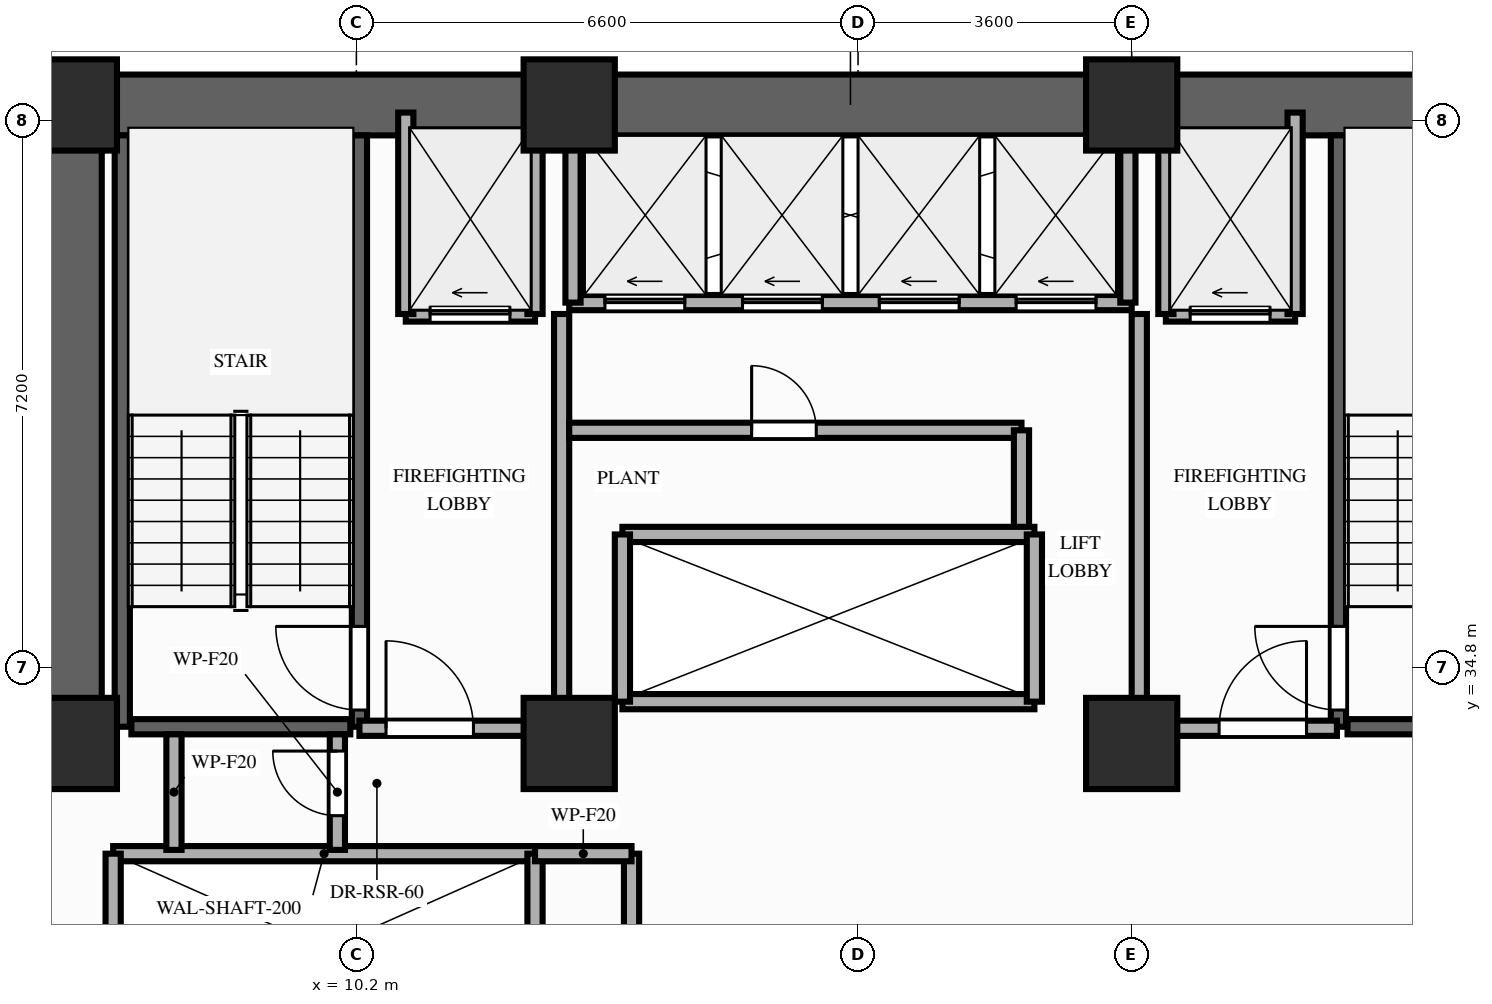
"""IFC4 building model, lengths in metres.
Left out: names, types, materials, properties, quantities, classifications, styles, units other than length and angle.
Written with IfcOpenShell. Run it as: python <this file> out.ifc"""

import sys

from ifc_helpers import new_model, si_unit, direction, frame, frame_2d, origin, origin_2d, place, context, subcontext, project, spatial, rectangle, extrude, element, fill, save


model = new_model("IFC4")
c1 = context("Model", 3, precision=1e-05, world=origin(), true_north=direction((0.0, 1.0)))
c2 = subcontext(c1, "Body", "Model", "MODEL_VIEW")
j1 = project(units=[si_unit("LENGTHUNIT", "METRE"), si_unit("PLANEANGLEUNIT", "RADIAN")], contexts=[c1])
p1 = place(None, origin())
s1 = spatial("IfcSite", under=j1, at=p1, CompositionType="ELEMENT")
p2 = place(p1, origin())
s2 = spatial("IfcBuilding", under=s1, at=p2, CompositionType="ELEMENT")
p3 = place(p2, frame((0.0, 0.0, 59.6)))
s3 = spatial("IfcBuildingStorey", under=s2, at=p3, CompositionType="ELEMENT", Elevation=59.6)
for number, where, z_axis, x_axis in (
    (1, (6.45, 33.8, 0.0), (0.0, 0.0, 1.0), (1.0, 0.0, 0.0)),
    (2, (13.0, 33.8, 0.0), (0.0, 0.0, 1.0), (1.0, 0.0, 0.0)),
    (3, (20.4, 33.8, 0.0), (0.0, 0.0, 1.0), (1.0, 0.0, 0.0)),
    (4, (6.45, 42.2, 0.0), (0.0, 0.0, 1.0), (1.0, 0.0, 0.0)),
    (5, (13.0, 42.2, 0.0), (0.0, 0.0, 1.0), (1.0, 0.0, 0.0)),
    (6, (20.4, 42.2, 0.0), (0.0, 0.0, 1.0), (1.0, 0.0, 0.0)),
):
    element("IfcColumn", number, at=place(p3, frame(where, z_axis=z_axis, x_axis=x_axis)), inside=s3, PredefinedType="COLUMN", context=c2, shape_type="SweptSolid", body=[
        extrude(rectangle(XDim=1.2, YDim=1.2, at=origin_2d()), origin(), (0.0, 0.0, 1.0), 3.2),
    ])
p4 = place(p3, frame((6.45, 42.2, 0.0), z_axis=(0.0, 0.0, 1.0), x_axis=(1.0, 0.0, 0.0)))
e7 = element("IfcWall", 7, at=p4, inside=s3, PredefinedType="SHEAR", context=c2, shape_type="SweptSolid", body=[
    extrude(rectangle(XDim=20.45, YDim=0.8, at=frame_2d((10.225, 0.0))), origin(), (0.0, 0.0, 1.0), 3.02),
])
p5 = place(p3, frame((6.45, 33.8, 0.0), z_axis=(0.0, 0.0, 1.0), x_axis=(0.0, 1.0, 0.0)))
e8 = element("IfcWall", 8, at=p5, inside=s3, PredefinedType="SHEAR", context=c2, shape_type="SweptSolid", body=[
    extrude(rectangle(XDim=7.95, YDim=0.8, at=frame_2d((3.975, 0.0))), origin(), (0.0, 0.0, 1.0), 3.02),
])
p6 = place(p3, frame((7.12, 34.02, 0.0), z_axis=(0.0, 0.0, 1.0), x_axis=(0.0, 1.0, 0.0)))
e9 = element("IfcWall", 9, at=p6, inside=s3, PredefinedType="SHEAR", context=c2, shape_type="SweptSolid", body=[
    extrude(rectangle(XDim=7.78, YDim=0.2, at=frame_2d((3.89, 0.0))), origin(), (0.0, 0.0, 1.0), 3.02),
])
p7 = place(p3, frame((10.24, 34.02, 0.0), z_axis=(0.0, 0.0, 1.0), x_axis=(0.0, 1.0, 0.0)))
e10 = element("IfcWall", 10, at=p7, inside=s3, PredefinedType="SHEAR", context=c2, shape_type="SweptSolid", body=[
    extrude(rectangle(XDim=7.78, YDim=0.2, at=frame_2d((3.89, 0.0))), origin(), (0.0, 0.0, 1.0), 3.02),
])
p8 = place(p7, frame((0.22, 0.0, 0.0)))
e11 = element("IfcOpeningElement", 11, at=p8, cuts=e10, PredefinedType="OPENING", context=c2, shape_type="SweptSolid", body=[
    extrude(rectangle(XDim=1.1, YDim=2.15, at=frame_2d((0.55, 1.075))), frame((0.0, 0.11, 0.0), z_axis=(0.0, -1.0, 0.0), x_axis=(1.0, 0.0, 0.0)), (0.0, 0.0, 1.0), 0.22),
])
p9 = place(p3, frame((7.24, 34.02, 0.0), z_axis=(0.0, 0.0, 1.0), x_axis=(1.0, 0.0, 0.0)))
e12 = element("IfcWall", 12, at=p9, inside=s3, PredefinedType="SHEAR", context=c2, shape_type="SweptSolid", body=[
    extrude(rectangle(XDim=2.88, YDim=0.2, at=frame_2d((1.44, 0.0))), origin(), (0.0, 0.0, 1.0), 3.02),
])
p10 = place(p3, frame((23.12, 34.02, 0.0), z_axis=(0.0, 0.0, 1.0), x_axis=(0.0, 1.0, 0.0)))
e13 = element("IfcWall", 13, at=p10, inside=s3, PredefinedType="SHEAR", context=c2, shape_type="SweptSolid", body=[
    extrude(rectangle(XDim=7.78, YDim=0.2, at=frame_2d((3.89, 0.0))), origin(), (0.0, 0.0, 1.0), 3.02),
])
p11 = place(p10, frame((0.22, 0.0, 0.0)))
e14 = element("IfcOpeningElement", 14, at=p11, cuts=e13, PredefinedType="OPENING", context=c2, shape_type="SweptSolid", body=[
    extrude(rectangle(XDim=1.1, YDim=2.15, at=frame_2d((0.55, 1.075))), frame((0.0, 0.11, 0.0), z_axis=(0.0, -1.0, 0.0), x_axis=(1.0, 0.0, 0.0)), (0.0, 0.0, 1.0), 0.22),
])
p12 = place(p3, frame((23.24, 34.02, 0.0), z_axis=(0.0, 0.0, 1.0), x_axis=(1.0, 0.0, 0.0)))
e15 = element("IfcWall", 15, at=p12, inside=s3, PredefinedType="SHEAR", context=c2, shape_type="SweptSolid", body=[
    extrude(rectangle(XDim=2.88, YDim=0.2, at=frame_2d((1.44, 0.0))), origin(), (0.0, 0.0, 1.0), 3.02),
])
p13 = place(p3, frame((7.0, 32.35, 0.0), z_axis=(0.0, 0.0, 1.0), x_axis=(1.0, 0.0, 0.0)))
e16 = element("IfcWall", 16, at=p13, inside=s3, PredefinedType="MOVABLE", context=c2, shape_type="SweptSolid", body=[
    extrude(rectangle(XDim=5.55, YDim=0.2, at=frame_2d((2.775, 0.0))), origin(), (0.0, 0.0, 1.0), 3.02),
])
for number, where, z_axis, x_axis in (
    (17, (7.0, 29.85, 0.0), (0.0, 0.0, 1.0), (0.0, 1.0, 0.0)),
    (18, (12.55, 29.85, 0.0), (0.0, 0.0, 1.0), (0.0, 1.0, 0.0)),
):
    element("IfcWall", number, at=place(p3, frame(where, z_axis=z_axis, x_axis=x_axis)), inside=s3, PredefinedType="MOVABLE", context=c2, shape_type="SweptSolid", body=[
        extrude(rectangle(XDim=2.5, YDim=0.2, at=frame_2d((1.25, 0.0))), origin(), (0.0, 0.0, 1.0), 3.02),
    ])
p14 = place(p3, frame((10.85, 39.45, 0.0), z_axis=(0.0, 0.0, 1.0), x_axis=(1.0, 0.0, 0.0)))
e19 = element("IfcWall", 19, at=p14, inside=s3, PredefinedType="MOVABLE", context=c2, shape_type="SweptSolid", body=[
    extrude(rectangle(XDim=1.7, YDim=0.2, at=frame_2d((0.85, 0.0))), origin(), (0.0, 0.0, 1.0), 3.02),
])
p15 = place(p14, frame((0.32, 0.0, 0.0)))
e20 = element("IfcOpeningElement", 20, at=p15, cuts=e19, PredefinedType="OPENING", context=c2, shape_type="SweptSolid", body=[
    extrude(rectangle(XDim=1.05, YDim=2.15, at=frame_2d((0.525, 1.075))), frame((0.0, 0.11, 0.0), z_axis=(0.0, -1.0, 0.0), x_axis=(1.0, 0.0, 0.0)), (0.0, 0.0, 1.0), 0.22),
])
p16 = place(p3, frame((20.85, 39.45, 0.0), z_axis=(0.0, 0.0, 1.0), x_axis=(1.0, 0.0, 0.0)))
e21 = element("IfcWall", 21, at=p16, inside=s3, PredefinedType="MOVABLE", context=c2, shape_type="SweptSolid", body=[
    extrude(rectangle(XDim=1.7, YDim=0.2, at=frame_2d((0.85, 0.0))), origin(), (0.0, 0.0, 1.0), 3.02),
])
p17 = place(p16, frame((0.32, 0.0, 0.0)))
e22 = element("IfcOpeningElement", 22, at=p17, cuts=e21, PredefinedType="OPENING", context=c2, shape_type="SweptSolid", body=[
    extrude(rectangle(XDim=1.05, YDim=2.15, at=frame_2d((0.525, 1.075))), frame((0.0, 0.11, 0.0), z_axis=(0.0, -1.0, 0.0), x_axis=(1.0, 0.0, 0.0)), (0.0, 0.0, 1.0), 0.22),
])
for number, where, z_axis, x_axis in (
    (23, (10.85, 39.45, 0.0), (0.0, 0.0, 1.0), (0.0, 1.0, 0.0)),
    (24, (12.55, 39.45, 0.0), (0.0, 0.0, 1.0), (0.0, 1.0, 0.0)),
):
    element("IfcWall", number, at=place(p3, frame(where, z_axis=z_axis, x_axis=x_axis)), inside=s3, PredefinedType="MOVABLE", context=c2, shape_type="SweptSolid", body=[
        extrude(rectangle(XDim=2.65, YDim=0.2, at=frame_2d((1.325, 0.0))), origin(), (0.0, 0.0, 1.0), 2.41),
    ])
p18 = place(p3, frame((12.9, 34.0, 0.0), z_axis=(0.0, 0.0, 1.0), x_axis=(0.0, 1.0, 0.0)))
e25 = element("IfcWall", 25, at=p18, inside=s3, PredefinedType="PARTITIONING", context=c2, shape_type="SweptSolid", body=[
    extrude(rectangle(XDim=5.45, YDim=0.2, at=frame_2d((2.725, 0.0))), origin(), (0.0, 0.0, 1.0), 2.41),
])
p19 = place(p3, frame((10.24, 34.0, 0.0), z_axis=(0.0, 0.0, 1.0), x_axis=(1.0, 0.0, 0.0)))
e26 = element("IfcWall", 26, at=p19, inside=s3, PredefinedType="PARTITIONING", context=c2, shape_type="SweptSolid", body=[
    extrude(rectangle(XDim=2.66, YDim=0.2, at=frame_2d((1.33, 0.0))), origin(), (0.0, 0.0, 1.0), 2.41),
])
p20 = place(p19, frame((0.35, 0.0, 0.0)))
e27 = element("IfcOpeningElement", 27, at=p20, cuts=e26, PredefinedType="OPENING", context=c2, shape_type="SweptSolid", body=[
    extrude(rectangle(XDim=1.15, YDim=2.15, at=frame_2d((0.575, 1.075))), frame((0.0, 0.11, 0.0), z_axis=(0.0, -1.0, 0.0), x_axis=(1.0, 0.0, 0.0)), (0.0, 0.0, 1.0), 0.22),
])
for number, where, z_axis, x_axis in (
    (28, (20.85, 39.45, 0.0), (0.0, 0.0, 1.0), (0.0, 1.0, 0.0)),
    (29, (22.55, 39.45, 0.0), (0.0, 0.0, 1.0), (0.0, 1.0, 0.0)),
):
    element("IfcWall", number, at=place(p3, frame(where, z_axis=z_axis, x_axis=x_axis)), inside=s3, PredefinedType="MOVABLE", context=c2, shape_type="SweptSolid", body=[
        extrude(rectangle(XDim=2.65, YDim=0.2, at=frame_2d((1.325, 0.0))), origin(), (0.0, 0.0, 1.0), 2.41),
    ])
p21 = place(p3, frame((20.5, 34.0, 0.0), z_axis=(0.0, 0.0, 1.0), x_axis=(0.0, 1.0, 0.0)))
e30 = element("IfcWall", 30, at=p21, inside=s3, PredefinedType="PARTITIONING", context=c2, shape_type="SweptSolid", body=[
    extrude(rectangle(XDim=5.45, YDim=0.2, at=frame_2d((2.725, 0.0))), origin(), (0.0, 0.0, 1.0), 2.41),
])
p22 = place(p3, frame((20.5, 34.0, 0.0), z_axis=(0.0, 0.0, 1.0), x_axis=(1.0, 0.0, 0.0)))
e31 = element("IfcWall", 31, at=p22, inside=s3, PredefinedType="PARTITIONING", context=c2, shape_type="SweptSolid", body=[
    extrude(rectangle(XDim=2.6, YDim=0.2, at=frame_2d((1.3, 0.0))), origin(), (0.0, 0.0, 1.0), 2.41),
])
p23 = place(p22, frame((1.05, 0.0, 0.0)))
e32 = element("IfcOpeningElement", 32, at=p23, cuts=e31, PredefinedType="OPENING", context=c2, shape_type="SweptSolid", body=[
    extrude(rectangle(XDim=1.15, YDim=2.15, at=frame_2d((0.575, 1.075))), frame((0.0, 0.11, 0.0), z_axis=(0.0, -1.0, 0.0), x_axis=(1.0, 0.0, 0.0)), (0.0, 0.0, 1.0), 0.22),
])
p24 = place(p3, frame((13.82, 29.85, 0.0), z_axis=(0.0, 0.0, 1.0), x_axis=(0.0, 1.0, 0.0)))
e33 = element("IfcWall", 33, at=p24, inside=s3, PredefinedType="PARTITIONING", context=c2, shape_type="SweptSolid", body=[
    extrude(rectangle(XDim=2.5, YDim=0.2, at=frame_2d((1.25, 0.0))), origin(), (0.0, 0.0, 1.0), 3.02),
])
p25 = place(p3, frame((12.55, 32.35, 0.0), z_axis=(0.0, 0.0, 1.0), x_axis=(1.0, 0.0, 0.0)))
e34 = element("IfcWall", 34, at=p25, inside=s3, PredefinedType="PARTITIONING", context=c2, shape_type="SweptSolid", body=[
    extrude(rectangle(XDim=1.27, YDim=0.2, at=frame_2d((0.635, 0.0))), origin(), (0.0, 0.0, 1.0), 3.02),
])
p26 = place(p3, frame((7.8, 32.4, 0.0), z_axis=(0.0, 0.0, 1.0), x_axis=(0.0, 1.0, 0.0)))
e35 = element("IfcWall", 35, at=p26, inside=s3, PredefinedType="PARTITIONING", context=c2, shape_type="SweptSolid", body=[
    extrude(rectangle(XDim=1.52, YDim=0.2, at=frame_2d((0.76, 0.0))), origin(), (0.0, 0.0, 1.0), 2.41),
])
p27 = place(p3, frame((9.95, 32.4, 0.0), z_axis=(0.0, 0.0, 1.0), x_axis=(0.0, 1.0, 0.0)))
e36 = element("IfcWall", 36, at=p27, inside=s3, PredefinedType="PARTITIONING", context=c2, shape_type="SweptSolid", body=[
    extrude(rectangle(XDim=1.52, YDim=0.2, at=frame_2d((0.76, 0.0))), origin(), (0.0, 0.0, 1.0), 2.41),
])
p28 = place(p27, frame((0.45, 0.0, 0.0)))
e37 = element("IfcOpeningElement", 37, at=p28, cuts=e36, PredefinedType="OPENING", context=c2, shape_type="SweptSolid", body=[
    extrude(rectangle(XDim=0.85, YDim=2.05, at=frame_2d((0.425, 1.025))), frame((0.0, 0.11, 0.0), z_axis=(0.0, -1.0, 0.0), x_axis=(1.0, 0.0, 0.0)), (0.0, 0.0, 1.0), 0.22),
])
p29 = place(p3, frame((13.0, 39.6, 0.0), z_axis=(0.0, 0.0, 1.0), x_axis=(1.0, 0.0, 0.0)))
e38 = element("IfcWall", 38, at=p29, inside=s3, PredefinedType="MOVABLE", context=c2, shape_type="SweptSolid", body=[
    extrude(rectangle(XDim=7.4, YDim=0.2, at=frame_2d((3.7, 0.0))), origin(), (0.0, 0.0, 1.0), 3.02),
])
p30 = place(p29, frame((0.47, 0.0, 0.0)))
e39 = element("IfcOpeningElement", 39, at=p30, cuts=e38, PredefinedType="OPENING", context=c2, shape_type="SweptSolid", body=[
    extrude(rectangle(XDim=1.05, YDim=2.15, at=frame_2d((0.525, 1.075))), frame((0.0, 0.11, 0.0), z_axis=(0.0, -1.0, 0.0), x_axis=(1.0, 0.0, 0.0)), (0.0, 0.0, 1.0), 0.22),
])
p31 = place(p29, frame((2.28, 0.0, 0.0)))
e40 = element("IfcOpeningElement", 40, at=p31, cuts=e38, PredefinedType="OPENING", context=c2, shape_type="SweptSolid", body=[
    extrude(rectangle(XDim=1.05, YDim=2.15, at=frame_2d((0.525, 1.075))), frame((0.0, 0.11, 0.0), z_axis=(0.0, -1.0, 0.0), x_axis=(1.0, 0.0, 0.0)), (0.0, 0.0, 1.0), 0.22),
])
p32 = place(p29, frame((4.08, 0.0, 0.0)))
e41 = element("IfcOpeningElement", 41, at=p32, cuts=e38, PredefinedType="OPENING", context=c2, shape_type="SweptSolid", body=[
    extrude(rectangle(XDim=1.05, YDim=2.15, at=frame_2d((0.525, 1.075))), frame((0.0, 0.11, 0.0), z_axis=(0.0, -1.0, 0.0), x_axis=(1.0, 0.0, 0.0)), (0.0, 0.0, 1.0), 0.22),
])
p33 = place(p29, frame((5.88, 0.0, 0.0)))
e42 = element("IfcOpeningElement", 42, at=p33, cuts=e38, PredefinedType="OPENING", context=c2, shape_type="SweptSolid", body=[
    extrude(rectangle(XDim=1.05, YDim=2.15, at=frame_2d((0.525, 1.075))), frame((0.0, 0.11, 0.0), z_axis=(0.0, -1.0, 0.0), x_axis=(1.0, 0.0, 0.0)), (0.0, 0.0, 1.0), 0.22),
])
for number, where, z_axis, x_axis in (
    (43, (13.05, 39.6, 0.0), (0.0, 0.0, 1.0), (0.0, 1.0, 0.0)),
    (44, (20.35, 39.6, 0.0), (0.0, 0.0, 1.0), (0.0, 1.0, 0.0)),
):
    element("IfcWall", number, at=place(p3, frame(where, z_axis=z_axis, x_axis=x_axis)), inside=s3, PredefinedType="MOVABLE", context=c2, shape_type="SweptSolid", body=[
        extrude(rectangle(XDim=2.18, YDim=0.2, at=frame_2d((1.09, 0.0))), origin(), (0.0, 0.0, 1.0), 3.02),
    ])
p34 = place(p3, frame((13.0, 37.92, 0.0), z_axis=(0.0, 0.0, 1.0), x_axis=(1.0, 0.0, 0.0)))
e45 = element("IfcWall", 45, at=p34, inside=s3, PredefinedType="PARTITIONING", context=c2, shape_type="SweptSolid", body=[
    extrude(rectangle(XDim=5.95, YDim=0.2, at=frame_2d((2.975, 0.0))), origin(), (0.0, 0.0, 1.0), 3.02),
])
p35 = place(p34, frame((2.4, 0.0, 0.0)))
e46 = element("IfcOpeningElement", 46, at=p35, cuts=e45, PredefinedType="OPENING", context=c2, shape_type="SweptSolid", body=[
    extrude(rectangle(XDim=0.85, YDim=2.05, at=frame_2d((0.425, 1.025))), frame((0.0, 0.11, 0.0), z_axis=(0.0, -1.0, 0.0), x_axis=(1.0, 0.0, 0.0)), (0.0, 0.0, 1.0), 0.22),
])
p36 = place(p3, frame((18.95, 36.6, 0.0), z_axis=(0.0, 0.0, 1.0), x_axis=(0.0, 1.0, 0.0)))
e47 = element("IfcWall", 47, at=p36, inside=s3, PredefinedType="PARTITIONING", context=c2, shape_type="SweptSolid", body=[
    extrude(rectangle(XDim=1.32, YDim=0.2, at=frame_2d((0.66, 0.0))), origin(), (0.0, 0.0, 1.0), 3.02),
])
for number, where, z_axis, x_axis in (
    (48, (13.7, 34.35, 0.0), (0.0, 0.0, 1.0), (1.0, 0.0, 0.0)),
    (49, (13.7, 36.55, 0.0), (0.0, 0.0, 1.0), (1.0, 0.0, 0.0)),
):
    element("IfcWall", number, at=place(p3, frame(where, z_axis=z_axis, x_axis=x_axis)), inside=s3, PredefinedType="MOVABLE", context=c2, shape_type="SweptSolid", body=[
        extrude(rectangle(XDim=5.42, YDim=0.2, at=frame_2d((2.71, 0.0))), origin(), (0.0, 0.0, 1.0), 3.02),
    ])
for number, where, z_axis, x_axis in (
    (50, (13.7, 34.35, 0.0), (0.0, 0.0, 1.0), (0.0, 1.0, 0.0)),
    (51, (19.12, 34.35, 0.0), (0.0, 0.0, 1.0), (0.0, 1.0, 0.0)),
):
    element("IfcWall", number, at=place(p3, frame(where, z_axis=z_axis, x_axis=x_axis)), inside=s3, PredefinedType="MOVABLE", context=c2, shape_type="SweptSolid", body=[
        extrude(rectangle(XDim=2.2, YDim=0.2, at=frame_2d((1.1, 0.0))), origin(), (0.0, 0.0, 1.0), 3.02),
    ])
p37 = place(p8, origin())
e52 = element("IfcDoor", 52, at=p37, inside=s3, OperationType="SINGLE_SWING_RIGHT", PredefinedType="DOOR", context=c2, shape_type="SweptSolid", body=[
    extrude(rectangle(XDim=1.1, YDim=2.15, at=frame_2d((0.55, 1.075))), frame((0.0, 0.025, 0.0), z_axis=(0.0, -1.0, 0.0), x_axis=(1.0, 0.0, 0.0)), (0.0, 0.0, 1.0), 0.05),
])
fill(e11, e52)
p38 = place(p11, origin())
e53 = element("IfcDoor", 53, at=p38, inside=s3, OperationType="SINGLE_SWING_RIGHT", PredefinedType="DOOR", context=c2, shape_type="SweptSolid", body=[
    extrude(rectangle(XDim=1.1, YDim=2.15, at=frame_2d((0.55, 1.075))), frame((0.0, 0.025, 0.0), z_axis=(0.0, -1.0, 0.0), x_axis=(1.0, 0.0, 0.0)), (0.0, 0.0, 1.0), 0.05),
])
fill(e14, e53)
p39 = place(p15, origin())
e54 = element("IfcDoor", 54, at=p39, inside=s3, OperationType="SLIDING_TO_LEFT", PredefinedType="DOOR", context=c2, shape_type="SweptSolid", body=[
    extrude(rectangle(XDim=1.05, YDim=2.15, at=frame_2d((0.525, 1.075))), frame((0.0, 0.025, 0.0), z_axis=(0.0, -1.0, 0.0), x_axis=(1.0, 0.0, 0.0)), (0.0, 0.0, 1.0), 0.05),
])
fill(e20, e54)
p40 = place(p17, origin())
e55 = element("IfcDoor", 55, at=p40, inside=s3, OperationType="SLIDING_TO_LEFT", PredefinedType="DOOR", context=c2, shape_type="SweptSolid", body=[
    extrude(rectangle(XDim=1.05, YDim=2.15, at=frame_2d((0.525, 1.075))), frame((0.0, 0.025, 0.0), z_axis=(0.0, -1.0, 0.0), x_axis=(1.0, 0.0, 0.0)), (0.0, 0.0, 1.0), 0.05),
])
fill(e22, e55)
p41 = place(p20, origin())
e56 = element("IfcDoor", 56, at=p41, inside=s3, OperationType="SINGLE_SWING_LEFT", PredefinedType="DOOR", context=c2, shape_type="SweptSolid", body=[
    extrude(rectangle(XDim=1.15, YDim=2.15, at=frame_2d((0.575, 1.075))), frame((0.0, 0.025, 0.0), z_axis=(0.0, -1.0, 0.0), x_axis=(1.0, 0.0, 0.0)), (0.0, 0.0, 1.0), 0.05),
])
fill(e27, e56)
p42 = place(p23, origin())
e57 = element("IfcDoor", 57, at=p42, inside=s3, OperationType="SINGLE_SWING_RIGHT", PredefinedType="DOOR", context=c2, shape_type="SweptSolid", body=[
    extrude(rectangle(XDim=1.15, YDim=2.15, at=frame_2d((0.575, 1.075))), frame((0.0, 0.025, 0.0), z_axis=(0.0, -1.0, 0.0), x_axis=(1.0, 0.0, 0.0)), (0.0, 0.0, 1.0), 0.05),
])
fill(e32, e57)
p43 = place(p28, origin())
e58 = element("IfcDoor", 58, at=p43, inside=s3, OperationType="SINGLE_SWING_RIGHT", PredefinedType="DOOR", context=c2, shape_type="SweptSolid", body=[
    extrude(rectangle(XDim=0.85, YDim=2.05, at=frame_2d((0.425, 1.025))), frame((0.0, 0.025, 0.0), z_axis=(0.0, -1.0, 0.0), x_axis=(1.0, 0.0, 0.0)), (0.0, 0.0, 1.0), 0.05),
])
fill(e37, e58)
p44 = place(p30, origin())
e59 = element("IfcDoor", 59, at=p44, inside=s3, OperationType="SLIDING_TO_LEFT", PredefinedType="DOOR", context=c2, shape_type="SweptSolid", body=[
    extrude(rectangle(XDim=1.05, YDim=2.15, at=frame_2d((0.525, 1.075))), frame((0.0, 0.025, 0.0), z_axis=(0.0, -1.0, 0.0), x_axis=(1.0, 0.0, 0.0)), (0.0, 0.0, 1.0), 0.05),
])
fill(e39, e59)
p45 = place(p31, origin())
e60 = element("IfcDoor", 60, at=p45, inside=s3, OperationType="SLIDING_TO_LEFT", PredefinedType="DOOR", context=c2, shape_type="SweptSolid", body=[
    extrude(rectangle(XDim=1.05, YDim=2.15, at=frame_2d((0.525, 1.075))), frame((0.0, 0.025, 0.0), z_axis=(0.0, -1.0, 0.0), x_axis=(1.0, 0.0, 0.0)), (0.0, 0.0, 1.0), 0.05),
])
fill(e40, e60)
p46 = place(p32, origin())
e61 = element("IfcDoor", 61, at=p46, inside=s3, OperationType="SLIDING_TO_LEFT", PredefinedType="DOOR", context=c2, shape_type="SweptSolid", body=[
    extrude(rectangle(XDim=1.05, YDim=2.15, at=frame_2d((0.525, 1.075))), frame((0.0, 0.025, 0.0), z_axis=(0.0, -1.0, 0.0), x_axis=(1.0, 0.0, 0.0)), (0.0, 0.0, 1.0), 0.05),
])
fill(e41, e61)
p47 = place(p33, origin())
e62 = element("IfcDoor", 62, at=p47, inside=s3, OperationType="SLIDING_TO_LEFT", PredefinedType="DOOR", context=c2, shape_type="SweptSolid", body=[
    extrude(rectangle(XDim=1.05, YDim=2.15, at=frame_2d((0.525, 1.075))), frame((0.0, 0.025, 0.0), z_axis=(0.0, -1.0, 0.0), x_axis=(1.0, 0.0, 0.0)), (0.0, 0.0, 1.0), 0.05),
])
fill(e42, e62)
p48 = place(p35, origin())
e63 = element("IfcDoor", 63, at=p48, inside=s3, OperationType="SINGLE_SWING_LEFT", PredefinedType="DOOR", context=c2, shape_type="SweptSolid", body=[
    extrude(rectangle(XDim=0.85, YDim=2.05, at=frame_2d((0.425, 1.025))), frame((0.0, 0.025, 0.0), z_axis=(0.0, -1.0, 0.0), x_axis=(1.0, 0.0, 0.0)), (0.0, 0.0, 1.0), 0.05),
])
fill(e46, e63)
save(model, sys.argv[1])
